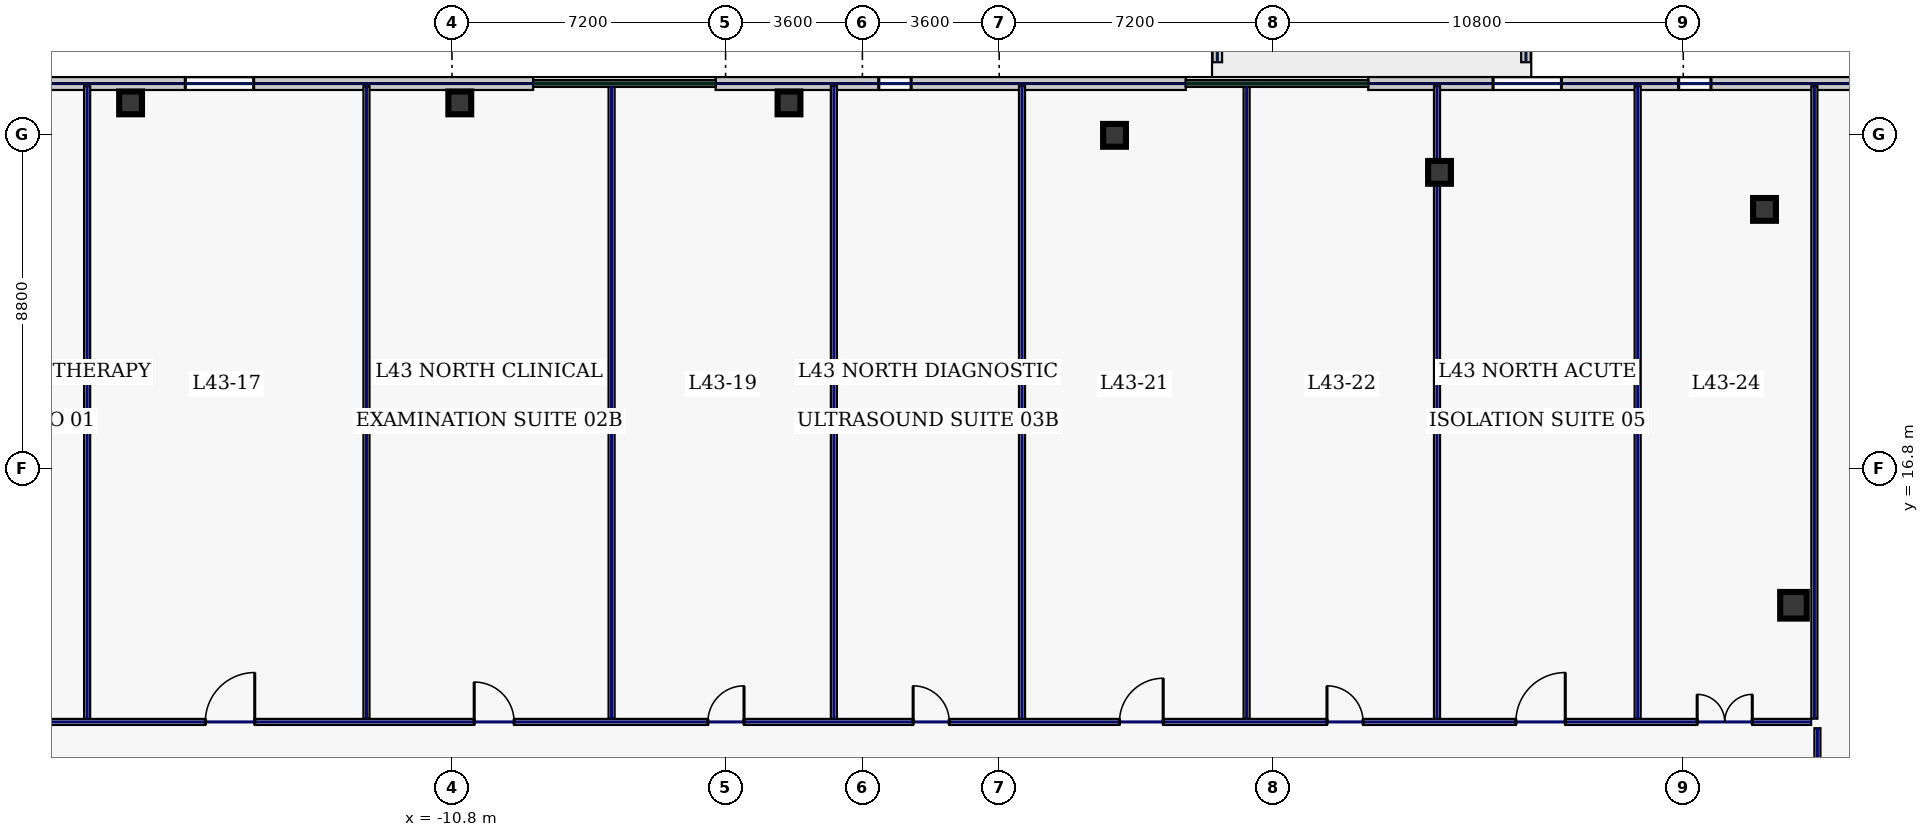
"""IFC4 building model, lengths in metres.
Left out: names, types, materials, properties, quantities, classifications, styles, units other than length and angle.
Written with IfcOpenShell. Run it as: python <this file> out.ifc"""

import sys

from ifc_helpers import new_model, si_unit, direction, frame, frame_2d, origin, origin_2d, place, context, subcontext, project, spatial, rectangle, hollow_rectangle, extrude, element, fill, save


model = new_model("IFC4")
c1 = context("Model", 3, precision=1e-05, world=origin(), true_north=direction((0.0, 1.0)))
c2 = subcontext(c1, "Body", "Model", "MODEL_VIEW")
j1 = project(units=[si_unit("LENGTHUNIT", "METRE"), si_unit("PLANEANGLEUNIT", "RADIAN")], contexts=[c1])
p1 = place(None, origin())
s1 = spatial("IfcSite", under=j1, at=p1, CompositionType="ELEMENT")
p2 = place(p1, origin())
s2 = spatial("IfcBuilding", under=s1, at=p2, CompositionType="ELEMENT")
p3 = place(p2, frame((0.0, 0.0, 188.2)))
s3 = spatial("IfcBuildingStorey", under=s2, at=p3, CompositionType="ELEMENT", Elevation=188.2)
p4 = place(p3, frame((24.5, 13.2, 0.0), z_axis=(0.0, 0.0, 1.0), x_axis=(1.0, 0.0, 0.0)))
e1 = element("IfcColumn", 1, at=p4, inside=s3, PredefinedType="COLUMN", context=c2, shape_type="SweptSolid", body=[
    extrude(hollow_rectangle(XDim=0.7, YDim=0.7, WallThickness=0.032, at=origin_2d()), origin(), (0.0, 0.0, 1.0), 3.74),
])
for number, where, z_axis, x_axis in (
    (2, (23.738, 23.618, 0.0), (0.0, 0.0, 1.0), (1.0, 0.0, 0.0)),
    (3, (15.186, 24.592, 0.0), (0.0, 0.0, 1.0), (1.0, 0.0, 0.0)),
    (4, (6.634, 25.567, 0.0), (0.0, 0.0, 1.0), (1.0, 0.0, 0.0)),
    (5, (-1.931, 26.42, 0.0), (0.0, 0.0, 1.0), (1.0, 0.0, 0.0)),
    (6, (-10.594, 26.42, 0.0), (0.0, 0.0, 1.0), (1.0, 0.0, 0.0)),
    (7, (-19.257, 26.42, 0.0), (0.0, 0.0, 1.0), (1.0, 0.0, 0.0)),
):
    element("IfcColumn", number, at=place(p3, frame(where, z_axis=z_axis, x_axis=x_axis)), inside=s3, PredefinedType="COLUMN", context=c2, shape_type="SweptSolid", body=[
        extrude(hollow_rectangle(XDim=0.6, YDim=0.6, WallThickness=0.028, at=origin_2d()), origin(), (0.0, 0.0, 1.0), 3.74),
    ])
for number, where, z_axis, x_axis in (
    (8, (9.34, 27.49, 0.0), (0.0, 0.0, 1.0), (0.0, 1.0, 0.0)),
    (9, (17.46, 28.87, 0.0), (0.0, 0.0, 1.0), (0.0, -1.0, 0.0)),
):
    element("IfcWall", number, at=place(p3, frame(where, z_axis=z_axis, x_axis=x_axis)), inside=s3, PredefinedType="PARAPET", context=c2, shape_type="SweptSolid", body=[
        extrude(rectangle(XDim=1.38, YDim=0.25, at=frame_2d((0.69, 0.0))), origin(), (0.0, 0.0, 1.0), 1.15),
    ])
p5 = place(p3, frame((33.4, 26.93, 0.0), z_axis=(0.0, 0.0, 1.0), x_axis=(-1.0, 0.0, 0.0)))
e10 = element("IfcWall", 10, at=p5, inside=s3, PredefinedType="STANDARD", context=c2, shape_type="SweptSolid", body=[
    extrude(rectangle(XDim=20.09, YDim=0.34, at=frame_2d((10.045, 0.0))), origin(), (0.0, 0.0, 1.0), 3.74),
])
p6 = place(p5, frame((15.005, 0.0, 0.7)))
e11 = element("IfcOpeningElement", 11, at=p6, cuts=e10, PredefinedType="OPENING", context=c2, shape_type="SweptSolid", body=[
    extrude(rectangle(XDim=1.8, YDim=2.2, at=frame_2d((0.9, 1.1))), frame((0.0, 0.18, 0.0), z_axis=(0.0, -1.0, 0.0), x_axis=(1.0, 0.0, 0.0)), (0.0, 0.0, 1.0), 0.36),
])
p7 = place(p5, frame((11.071, 0.0, 0.7)))
e12 = element("IfcOpeningElement", 12, at=p7, cuts=e10, PredefinedType="OPENING", context=c2, shape_type="SweptSolid", body=[
    extrude(rectangle(XDim=0.85, YDim=1.85, at=frame_2d((0.425, 0.925))), frame((0.0, 0.18, 0.0), z_axis=(0.0, -1.0, 0.0), x_axis=(1.0, 0.0, 0.0)), (0.0, 0.0, 1.0), 0.36),
])
p8 = place(p5, frame((6.48, 0.0, 0.7)))
e13 = element("IfcOpeningElement", 13, at=p8, cuts=e10, PredefinedType="OPENING", context=c2, shape_type="SweptSolid", body=[
    extrude(rectangle(XDim=0.85, YDim=1.85, at=frame_2d((0.425, 0.925))), frame((0.0, 0.18, 0.0), z_axis=(0.0, -1.0, 0.0), x_axis=(1.0, 0.0, 0.0)), (0.0, 0.0, 1.0), 0.36),
])
p9 = place(p5, frame((2.591, 0.0, 0.7)))
e14 = element("IfcOpeningElement", 14, at=p9, cuts=e10, PredefinedType="OPENING", context=c2, shape_type="SweptSolid", body=[
    extrude(rectangle(XDim=1.8, YDim=2.2, at=frame_2d((0.9, 1.1))), frame((0.0, 0.18, 0.0), z_axis=(0.0, -1.0, 0.0), x_axis=(1.0, 0.0, 0.0)), (0.0, 0.0, 1.0), 0.36),
])
p10 = place(p3, frame((8.51, 26.93, 0.0), z_axis=(0.0, 0.0, 1.0), x_axis=(-1.0, 0.0, 0.0)))
e15 = element("IfcWall", 15, at=p10, inside=s3, PredefinedType="STANDARD", context=c2, shape_type="SweptSolid", body=[
    extrude(rectangle(XDim=12.373, YDim=0.34, at=frame_2d((6.187, 0.0))), origin(), (0.0, 0.0, 1.0), 3.74),
])
p11 = place(p10, frame((7.229, 0.0, 0.7)))
e16 = element("IfcOpeningElement", 16, at=p11, cuts=e15, PredefinedType="OPENING", context=c2, shape_type="SweptSolid", body=[
    extrude(rectangle(XDim=0.85, YDim=1.85, at=frame_2d((0.425, 0.925))), frame((0.0, 0.18, 0.0), z_axis=(0.0, -1.0, 0.0), x_axis=(1.0, 0.0, 0.0)), (0.0, 0.0, 1.0), 0.36),
])
p12 = place(p3, frame((-8.663, 26.93, 0.0), z_axis=(0.0, 0.0, 1.0), x_axis=(-1.0, 0.0, 0.0)))
e17 = element("IfcWall", 17, at=p12, inside=s3, PredefinedType="STANDARD", context=c2, shape_type="SweptSolid", body=[
    extrude(rectangle(XDim=19.937, YDim=0.34, at=frame_2d((9.969, 0.0))), origin(), (0.0, 0.0, 1.0), 3.74),
])
p13 = place(p12, frame((16.968, 0.0, 0.7)))
e18 = element("IfcOpeningElement", 18, at=p13, cuts=e17, PredefinedType="OPENING", context=c2, shape_type="SweptSolid", body=[
    extrude(rectangle(XDim=0.85, YDim=1.85, at=frame_2d((0.425, 0.925))), frame((0.0, 0.18, 0.0), z_axis=(0.0, -1.0, 0.0), x_axis=(1.0, 0.0, 0.0)), (0.0, 0.0, 1.0), 0.36),
])
p14 = place(p12, frame((12.983, 0.0, 0.7)))
e19 = element("IfcOpeningElement", 19, at=p14, cuts=e17, PredefinedType="OPENING", context=c2, shape_type="SweptSolid", body=[
    extrude(rectangle(XDim=0.85, YDim=1.85, at=frame_2d((0.425, 0.925))), frame((0.0, 0.18, 0.0), z_axis=(0.0, -1.0, 0.0), x_axis=(1.0, 0.0, 0.0)), (0.0, 0.0, 1.0), 0.36),
])
p15 = place(p12, frame((7.355, 0.0, 0.7)))
e20 = element("IfcOpeningElement", 20, at=p15, cuts=e17, PredefinedType="OPENING", context=c2, shape_type="SweptSolid", body=[
    extrude(rectangle(XDim=1.8, YDim=2.2, at=frame_2d((0.9, 1.1))), frame((0.0, 0.18, 0.0), z_axis=(0.0, -1.0, 0.0), x_axis=(1.0, 0.0, 0.0)), (0.0, 0.0, 1.0), 0.36),
])
p16 = place(p3, frame((-24.965, 10.13, 0.0), z_axis=(0.0, 0.0, 1.0), x_axis=(1.0, 0.0, 0.0)))
e21 = element("IfcWall", 21, at=p16, inside=s3, PredefinedType="PARTITIONING", context=c2, shape_type="SweptSolid", body=[
    extrude(rectangle(XDim=49.93, YDim=0.16, at=frame_2d((24.965, 0.0))), origin(), (0.0, 0.0, 1.0), 3.74),
])
p17 = place(p16, frame((2.044, 0.0, 0.0)))
e22 = element("IfcOpeningElement", 22, at=p17, cuts=e21, PredefinedType="OPENING", context=c2, shape_type="SweptSolid", body=[
    extrude(rectangle(XDim=0.95, YDim=2.2, at=frame_2d((0.475, 1.1))), frame((0.0, 0.09, 0.0), z_axis=(0.0, -1.0, 0.0), x_axis=(1.0, 0.0, 0.0)), (0.0, 0.0, 1.0), 0.18),
])
p18 = place(p16, frame((7.675, 0.0, 0.0)))
e23 = element("IfcOpeningElement", 23, at=p18, cuts=e21, PredefinedType="OPENING", context=c2, shape_type="SweptSolid", body=[
    extrude(rectangle(XDim=1.3, YDim=2.2, at=frame_2d((0.65, 1.1))), frame((0.0, 0.09, 0.0), z_axis=(0.0, -1.0, 0.0), x_axis=(1.0, 0.0, 0.0)), (0.0, 0.0, 1.0), 0.18),
])
p19 = place(p16, frame((14.75, 0.0, 0.0)))
e24 = element("IfcOpeningElement", 24, at=p19, cuts=e21, PredefinedType="OPENING", context=c2, shape_type="SweptSolid", body=[
    extrude(rectangle(XDim=1.05, YDim=2.2, at=frame_2d((0.525, 1.1))), frame((0.0, 0.09, 0.0), z_axis=(0.0, -1.0, 0.0), x_axis=(1.0, 0.0, 0.0)), (0.0, 0.0, 1.0), 0.18),
])
p20 = place(p16, frame((20.9, 0.0, 0.0)))
e25 = element("IfcOpeningElement", 25, at=p20, cuts=e21, PredefinedType="OPENING", context=c2, shape_type="SweptSolid", body=[
    extrude(rectangle(XDim=0.95, YDim=2.2, at=frame_2d((0.475, 1.1))), frame((0.0, 0.09, 0.0), z_axis=(0.0, -1.0, 0.0), x_axis=(1.0, 0.0, 0.0)), (0.0, 0.0, 1.0), 0.18),
])
p21 = place(p16, frame((26.3, 0.0, 0.0)))
e26 = element("IfcOpeningElement", 26, at=p21, cuts=e21, PredefinedType="OPENING", context=c2, shape_type="SweptSolid", body=[
    extrude(rectangle(XDim=0.95, YDim=2.2, at=frame_2d((0.475, 1.1))), frame((0.0, 0.09, 0.0), z_axis=(0.0, -1.0, 0.0), x_axis=(1.0, 0.0, 0.0)), (0.0, 0.0, 1.0), 0.18),
])
p22 = place(p16, frame((31.73, 0.0, 0.0)))
e27 = element("IfcOpeningElement", 27, at=p22, cuts=e21, PredefinedType="OPENING", context=c2, shape_type="SweptSolid", body=[
    extrude(rectangle(XDim=1.15, YDim=2.2, at=frame_2d((0.575, 1.1))), frame((0.0, 0.09, 0.0), z_axis=(0.0, -1.0, 0.0), x_axis=(1.0, 0.0, 0.0)), (0.0, 0.0, 1.0), 0.18),
])
p23 = place(p16, frame((37.19, 0.0, 0.0)))
e28 = element("IfcOpeningElement", 28, at=p23, cuts=e21, PredefinedType="OPENING", context=c2, shape_type="SweptSolid", body=[
    extrude(rectangle(XDim=0.95, YDim=2.2, at=frame_2d((0.475, 1.1))), frame((0.0, 0.09, 0.0), z_axis=(0.0, -1.0, 0.0), x_axis=(1.0, 0.0, 0.0)), (0.0, 0.0, 1.0), 0.18),
])
p24 = place(p16, frame((42.16, 0.0, 0.0)))
e29 = element("IfcOpeningElement", 29, at=p24, cuts=e21, PredefinedType="OPENING", context=c2, shape_type="SweptSolid", body=[
    extrude(rectangle(XDim=1.3, YDim=2.2, at=frame_2d((0.65, 1.1))), frame((0.0, 0.09, 0.0), z_axis=(0.0, -1.0, 0.0), x_axis=(1.0, 0.0, 0.0)), (0.0, 0.0, 1.0), 0.18),
])
p25 = place(p16, frame((46.931, 0.0, 0.0)))
e30 = element("IfcOpeningElement", 30, at=p25, cuts=e21, PredefinedType="OPENING", context=c2, shape_type="SweptSolid", body=[
    extrude(rectangle(XDim=1.45, YDim=2.2, at=frame_2d((0.725, 1.1))), frame((0.0, 0.09, 0.0), z_axis=(0.0, -1.0, 0.0), x_axis=(1.0, 0.0, 0.0)), (0.0, 0.0, 1.0), 0.18),
])
p26 = place(p3, frame((25.13, 9.965, 0.0), z_axis=(0.0, 0.0, 1.0), x_axis=(0.0, -1.0, 0.0)))
e31 = element("IfcWall", 31, at=p26, inside=s3, PredefinedType="PARTITIONING", context=c2, shape_type="SweptSolid", body=[
    extrude(rectangle(XDim=2.98, YDim=0.16, at=frame_2d((1.49, 0.0))), origin(), (0.0, 0.0, 1.0), 3.74),
])
p27 = place(p26, frame((1.1, 0.0, 0.0)))
e32 = element("IfcOpeningElement", 32, at=p27, cuts=e31, PredefinedType="OPENING", context=c2, shape_type="SweptSolid", body=[
    extrude(rectangle(XDim=0.95, YDim=2.2, at=frame_2d((0.475, 1.1))), frame((0.0, 0.09, 0.0), z_axis=(0.0, -1.0, 0.0), x_axis=(1.0, 0.0, 0.0)), (0.0, 0.0, 1.0), 0.18),
])
for number, where, z_axis, x_axis in (
    (33, (25.05, 10.215, 0.0), (0.0, 0.0, 1.0), (0.0, 1.0, 0.0)),
    (34, (-20.4, 10.215, 0.0), (0.0, 0.0, 1.0), (0.0, 1.0, 0.0)),
    (35, (-6.6, 10.215, 0.0), (0.0, 0.0, 1.0), (0.0, 1.0, 0.0)),
    (36, (4.2, 10.215, 0.0), (0.0, 0.0, 1.0), (0.0, 1.0, 0.0)),
    (37, (15.12, 10.215, 0.0), (0.0, 0.0, 1.0), (0.0, 1.0, 0.0)),
    (38, (20.4, 10.215, 0.0), (0.0, 0.0, 1.0), (0.0, 1.0, 0.0)),
    (39, (-13.05, 10.215, 0.0), (0.0, 0.0, 1.0), (0.0, 1.0, 0.0)),
    (40, (-0.75, 10.215, 0.0), (0.0, 0.0, 1.0), (0.0, 1.0, 0.0)),
    (41, (10.11, 10.215, 0.0), (0.0, 0.0, 1.0), (0.0, 1.0, 0.0)),
):
    element("IfcWall", number, at=place(p3, frame(where, z_axis=z_axis, x_axis=x_axis)), inside=s3, PredefinedType="PARTITIONING", context=c2, shape_type="SweptSolid", body=[
        extrude(rectangle(XDim=16.645, YDim=0.16, at=frame_2d((8.323, 0.0))), origin(), (0.0, 0.0, 1.0), 3.74),
    ])
p28 = place(p6, origin())
e42 = element("IfcWindow", 42, at=p28, inside=s3, PartitioningType="SINGLE_PANEL", PredefinedType="WINDOW", context=c2, shape_type="SweptSolid", body=[
    extrude(rectangle(XDim=1.8, YDim=2.2, at=frame_2d((0.9, 1.1))), frame((0.0, 0.03, 0.0), z_axis=(0.0, -1.0, 0.0), x_axis=(1.0, 0.0, 0.0)), (0.0, 0.0, 1.0), 0.06),
])
fill(e11, e42)
p29 = place(p7, origin())
e43 = element("IfcWindow", 43, at=p29, inside=s3, PartitioningType="SINGLE_PANEL", PredefinedType="WINDOW", context=c2, shape_type="SweptSolid", body=[
    extrude(rectangle(XDim=0.85, YDim=1.85, at=frame_2d((0.425, 0.925))), frame((0.0, 0.03, 0.0), z_axis=(0.0, -1.0, 0.0), x_axis=(1.0, 0.0, 0.0)), (0.0, 0.0, 1.0), 0.06),
])
fill(e12, e43)
p30 = place(p11, origin())
e44 = element("IfcWindow", 44, at=p30, inside=s3, PartitioningType="SINGLE_PANEL", PredefinedType="WINDOW", context=c2, shape_type="SweptSolid", body=[
    extrude(rectangle(XDim=0.85, YDim=1.85, at=frame_2d((0.425, 0.925))), frame((0.0, 0.03, 0.0), z_axis=(0.0, -1.0, 0.0), x_axis=(1.0, 0.0, 0.0)), (0.0, 0.0, 1.0), 0.06),
])
fill(e16, e44)
p31 = place(p15, origin())
e45 = element("IfcWindow", 45, at=p31, inside=s3, PartitioningType="SINGLE_PANEL", PredefinedType="WINDOW", context=c2, shape_type="SweptSolid", body=[
    extrude(rectangle(XDim=1.8, YDim=2.2, at=frame_2d((0.9, 1.1))), frame((0.0, 0.03, 0.0), z_axis=(0.0, -1.0, 0.0), x_axis=(1.0, 0.0, 0.0)), (0.0, 0.0, 1.0), 0.06),
])
fill(e20, e45)
p32 = place(p18, origin())
e46 = element("IfcDoor", 46, at=p32, inside=s3, OperationType="SINGLE_SWING_RIGHT", PredefinedType="DOOR", context=c2, shape_type="SweptSolid", body=[
    extrude(rectangle(XDim=1.3, YDim=2.2, at=frame_2d((0.65, 1.1))), frame((0.0, 0.025, 0.0), z_axis=(0.0, -1.0, 0.0), x_axis=(1.0, 0.0, 0.0)), (0.0, 0.0, 1.0), 0.05),
])
fill(e23, e46)
p33 = place(p19, origin())
e47 = element("IfcDoor", 47, at=p33, inside=s3, OperationType="SINGLE_SWING_LEFT", PredefinedType="DOOR", context=c2, shape_type="SweptSolid", body=[
    extrude(rectangle(XDim=1.05, YDim=2.2, at=frame_2d((0.525, 1.1))), frame((0.0, 0.025, 0.0), z_axis=(0.0, -1.0, 0.0), x_axis=(1.0, 0.0, 0.0)), (0.0, 0.0, 1.0), 0.05),
])
fill(e24, e47)
p34 = place(p20, origin())
e48 = element("IfcDoor", 48, at=p34, inside=s3, OperationType="SINGLE_SWING_RIGHT", PredefinedType="DOOR", context=c2, shape_type="SweptSolid", body=[
    extrude(rectangle(XDim=0.95, YDim=2.2, at=frame_2d((0.475, 1.1))), frame((0.0, 0.025, 0.0), z_axis=(0.0, -1.0, 0.0), x_axis=(1.0, 0.0, 0.0)), (0.0, 0.0, 1.0), 0.05),
])
fill(e25, e48)
p35 = place(p21, origin())
e49 = element("IfcDoor", 49, at=p35, inside=s3, OperationType="SINGLE_SWING_LEFT", PredefinedType="DOOR", context=c2, shape_type="SweptSolid", body=[
    extrude(rectangle(XDim=0.95, YDim=2.2, at=frame_2d((0.475, 1.1))), frame((0.0, 0.025, 0.0), z_axis=(0.0, -1.0, 0.0), x_axis=(1.0, 0.0, 0.0)), (0.0, 0.0, 1.0), 0.05),
])
fill(e26, e49)
p36 = place(p22, origin())
e50 = element("IfcDoor", 50, at=p36, inside=s3, OperationType="SINGLE_SWING_RIGHT", PredefinedType="DOOR", context=c2, shape_type="SweptSolid", body=[
    extrude(rectangle(XDim=1.15, YDim=2.2, at=frame_2d((0.575, 1.1))), frame((0.0, 0.025, 0.0), z_axis=(0.0, -1.0, 0.0), x_axis=(1.0, 0.0, 0.0)), (0.0, 0.0, 1.0), 0.05),
])
fill(e27, e50)
p37 = place(p23, origin())
e51 = element("IfcDoor", 51, at=p37, inside=s3, OperationType="SINGLE_SWING_LEFT", PredefinedType="DOOR", context=c2, shape_type="SweptSolid", body=[
    extrude(rectangle(XDim=0.95, YDim=2.2, at=frame_2d((0.475, 1.1))), frame((0.0, 0.025, 0.0), z_axis=(0.0, -1.0, 0.0), x_axis=(1.0, 0.0, 0.0)), (0.0, 0.0, 1.0), 0.05),
])
fill(e28, e51)
p38 = place(p24, origin())
e52 = element("IfcDoor", 52, at=p38, inside=s3, OperationType="SINGLE_SWING_RIGHT", PredefinedType="DOOR", context=c2, shape_type="SweptSolid", body=[
    extrude(rectangle(XDim=1.3, YDim=2.2, at=frame_2d((0.65, 1.1))), frame((0.0, 0.025, 0.0), z_axis=(0.0, -1.0, 0.0), x_axis=(1.0, 0.0, 0.0)), (0.0, 0.0, 1.0), 0.05),
])
fill(e29, e52)
p39 = place(p25, origin())
e53 = element("IfcDoor", 53, at=p39, inside=s3, OperationType="DOUBLE_SWING_LEFT", PredefinedType="DOOR", context=c2, shape_type="SweptSolid", body=[
    extrude(rectangle(XDim=1.45, YDim=2.2, at=frame_2d((0.725, 1.1))), frame((0.0, 0.025, 0.0), z_axis=(0.0, -1.0, 0.0), x_axis=(1.0, 0.0, 0.0)), (0.0, 0.0, 1.0), 0.05),
])
fill(e30, e53)
save(model, sys.argv[1])
